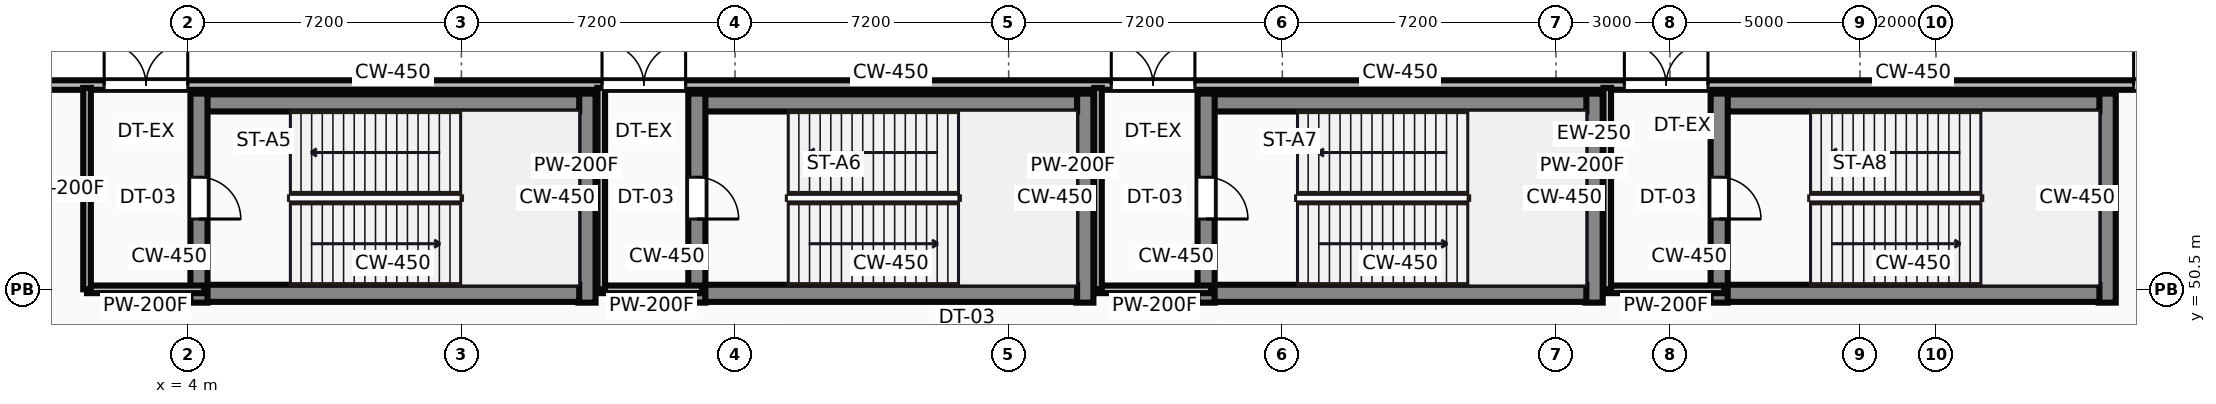
"""IFC4 building model, lengths in metres.
Left out: names, types, materials, properties, quantities, classifications, styles, units other than length and angle.
Written with IfcOpenShell. Run it as: python <this file> out.ifc"""

import sys

from ifc_helpers import new_model, si_unit, direction, frame, frame_2d, origin, place, context, subcontext, project, spatial, rectangle, extrude, source, transform, mapped, element, fill, save


model = new_model("IFC4")
c1 = context("Model", 3, precision=1e-05, world=origin(), true_north=direction((0.0, 1.0)))
c2 = subcontext(c1, "Body", "Model", "MODEL_VIEW")
j1 = project(units=[si_unit("LENGTHUNIT", "METRE"), si_unit("PLANEANGLEUNIT", "RADIAN")], contexts=[c1])
p1 = place(None, origin())
s1 = spatial("IfcSite", under=j1, at=p1, CompositionType="ELEMENT")
p2 = place(p1, origin())
s2 = spatial("IfcBuilding", under=s1, at=p2, CompositionType="ELEMENT")
p3 = place(p2, origin())
s3 = spatial("IfcBuildingStorey", under=s2, at=p3, CompositionType="ELEMENT", Elevation=0.0)
m1 = source(origin(), c2, "Body", "SweptSolid", [
    extrude(rectangle(XDim=82.0, YDim=0.25, at=frame_2d((41.0, 0.0))), origin(), (0.0, 0.0, 1.0), 5.7),
])
p4 = place(p3, frame((82.0, 55.875, 0.0), z_axis=(0.0, 0.0, 1.0), x_axis=(-1.0, 0.0, 0.0)))
e1 = element("IfcWall", 1, at=p4, inside=s3, PredefinedType="STANDARD", context=c2, shape_type="MappedRepresentation", body=[
    mapped(m1, transform((0.0, 0.0, 0.0))),
])
p5 = place(p4, frame((1.8, 0.0, 0.0)))
e2 = element("IfcOpeningElement", 2, at=p5, cuts=e1, PredefinedType="OPENING", context=c2, shape_type="SweptSolid", body=[
    extrude(rectangle(XDim=2.2, YDim=2.4, at=frame_2d((1.1, 1.2))), frame((0.0, 0.135, 0.0), z_axis=(0.0, -1.0, 0.0), x_axis=(1.0, 0.0, 0.0)), (0.0, 0.0, 1.0), 0.27),
])
p6 = place(p4, frame((14.9, 0.0, 0.0)))
e3 = element("IfcOpeningElement", 3, at=p6, cuts=e1, PredefinedType="OPENING", context=c2, shape_type="SweptSolid", body=[
    extrude(rectangle(XDim=2.2, YDim=2.4, at=frame_2d((1.1, 1.2))), frame((0.0, 0.135, 0.0), z_axis=(0.0, -1.0, 0.0), x_axis=(1.0, 0.0, 0.0)), (0.0, 0.0, 1.0), 0.27),
])
p7 = place(p4, frame((18.2, 0.0, 0.0)))
e4 = element("IfcOpeningElement", 4, at=p7, cuts=e1, PredefinedType="OPENING", context=c2, shape_type="SweptSolid", body=[
    extrude(rectangle(XDim=2.2, YDim=2.4, at=frame_2d((1.1, 1.2))), frame((0.0, 0.135, 0.0), z_axis=(0.0, -1.0, 0.0), x_axis=(1.0, 0.0, 0.0)), (0.0, 0.0, 1.0), 0.27),
])
p8 = place(p4, frame((21.4, 0.0, 0.0)))
e5 = element("IfcOpeningElement", 5, at=p8, cuts=e1, PredefinedType="OPENING", context=c2, shape_type="SweptSolid", body=[
    extrude(rectangle(XDim=2.2, YDim=2.4, at=frame_2d((1.1, 1.2))), frame((0.0, 0.135, 0.0), z_axis=(0.0, -1.0, 0.0), x_axis=(1.0, 0.0, 0.0)), (0.0, 0.0, 1.0), 0.27),
])
p9 = place(p4, frame((24.6, 0.0, 0.0)))
e6 = element("IfcOpeningElement", 6, at=p9, cuts=e1, PredefinedType="OPENING", context=c2, shape_type="SweptSolid", body=[
    extrude(rectangle(XDim=2.2, YDim=2.4, at=frame_2d((1.1, 1.2))), frame((0.0, 0.135, 0.0), z_axis=(0.0, -1.0, 0.0), x_axis=(1.0, 0.0, 0.0)), (0.0, 0.0, 1.0), 0.27),
])
p10 = place(p4, frame((38.0, 0.0, 0.0)))
e7 = element("IfcOpeningElement", 7, at=p10, cuts=e1, PredefinedType="OPENING", context=c2, shape_type="SweptSolid", body=[
    extrude(rectangle(XDim=2.2, YDim=2.4, at=frame_2d((1.1, 1.2))), frame((0.0, 0.135, 0.0), z_axis=(0.0, -1.0, 0.0), x_axis=(1.0, 0.0, 0.0)), (0.0, 0.0, 1.0), 0.27),
])
p11 = place(p4, frame((51.5, 0.0, 0.0)))
e8 = element("IfcOpeningElement", 8, at=p11, cuts=e1, PredefinedType="OPENING", context=c2, shape_type="SweptSolid", body=[
    extrude(rectangle(XDim=2.2, YDim=2.4, at=frame_2d((1.1, 1.2))), frame((0.0, 0.135, 0.0), z_axis=(0.0, -1.0, 0.0), x_axis=(1.0, 0.0, 0.0)), (0.0, 0.0, 1.0), 0.27),
])
p12 = place(p4, frame((64.9, 0.0, 0.0)))
e9 = element("IfcOpeningElement", 9, at=p12, cuts=e1, PredefinedType="OPENING", context=c2, shape_type="SweptSolid", body=[
    extrude(rectangle(XDim=2.2, YDim=2.4, at=frame_2d((1.1, 1.2))), frame((0.0, 0.135, 0.0), z_axis=(0.0, -1.0, 0.0), x_axis=(1.0, 0.0, 0.0)), (0.0, 0.0, 1.0), 0.27),
])
p13 = place(p4, frame((78.0, 0.0, 0.0)))
e10 = element("IfcOpeningElement", 10, at=p13, cuts=e1, PredefinedType="OPENING", context=c2, shape_type="SweptSolid", body=[
    extrude(rectangle(XDim=2.2, YDim=2.4, at=frame_2d((1.1, 1.2))), frame((0.0, 0.135, 0.0), z_axis=(0.0, -1.0, 0.0), x_axis=(1.0, 0.0, 0.0)), (0.0, 0.0, 1.0), 0.27),
])
p14 = place(p4, frame((6.5, 0.0, 0.9)))
e11 = element("IfcOpeningElement", 11, at=p14, cuts=e1, PredefinedType="OPENING", context=c2, shape_type="SweptSolid", body=[
    extrude(rectangle(XDim=3.0, YDim=2.4, at=frame_2d((1.5, 1.2))), frame((0.0, 0.135, 0.0), z_axis=(0.0, -1.0, 0.0), x_axis=(1.0, 0.0, 0.0)), (0.0, 0.0, 1.0), 0.27),
])
m2 = source(origin(), c2, "Body", "SweptSolid", [
    extrude(rectangle(XDim=5.5, YDim=0.45, at=frame_2d((2.75, 0.0))), origin(), (0.0, 0.0, 1.0), 6.0),
])
p15 = place(p3, frame((4.295, 50.15, 0.0), z_axis=(0.0, 0.0, 1.0), x_axis=(0.0, 1.0, 0.0)))
e12 = element("IfcWall", 12, at=p15, inside=s3, PredefinedType="SHEAR", context=c2, shape_type="MappedRepresentation", body=[
    mapped(m2, transform((0.0, 0.0, 0.0))),
])
p16 = place(p15, frame((2.2, 0.0, 0.0)))
e13 = element("IfcOpeningElement", 13, at=p16, cuts=e12, PredefinedType="OPENING", context=c2, shape_type="SweptSolid", body=[
    extrude(rectangle(XDim=1.1, YDim=2.15, at=frame_2d((0.55, 1.075))), frame((0.0, 0.235, 0.0), z_axis=(0.0, -1.0, 0.0), x_axis=(1.0, 0.0, 0.0)), (0.0, 0.0, 1.0), 0.47),
])
m3 = source(origin(), c2, "Body", "SweptSolid", [
    extrude(rectangle(XDim=9.8, YDim=0.45, at=frame_2d((4.9, 0.0))), origin(), (0.0, 0.0, 1.0), 6.0),
])
for number, where, z_axis, x_axis in (
    (14, (4.5, 50.395, 0.0), (0.0, 0.0, 1.0), (1.0, 0.0, 0.0)),
    (15, (4.5, 55.405, 0.0), (0.0, 0.0, 1.0), (1.0, 0.0, 0.0)),
):
    element("IfcWall", number, at=place(p3, frame(where, z_axis=z_axis, x_axis=x_axis)), inside=s3, PredefinedType="SHEAR", context=c2, shape_type="MappedRepresentation", body=[
        mapped(m3, transform((0.0, 0.0, 0.0))),
    ])
p17 = place(p3, frame((14.505, 50.15, 0.0), z_axis=(0.0, 0.0, 1.0), x_axis=(0.0, 1.0, 0.0)))
e16 = element("IfcWall", 16, at=p17, inside=s3, PredefinedType="SHEAR", context=c2, shape_type="MappedRepresentation", body=[
    mapped(m2, transform((0.0, 0.0, 0.0))),
])
p18 = place(p3, frame((17.395, 50.15, 0.0), z_axis=(0.0, 0.0, 1.0), x_axis=(0.0, 1.0, 0.0)))
e17 = element("IfcWall", 17, at=p18, inside=s3, PredefinedType="SHEAR", context=c2, shape_type="MappedRepresentation", body=[
    mapped(m2, transform((0.0, 0.0, 0.0))),
])
p19 = place(p18, frame((2.2, 0.0, 0.0)))
e18 = element("IfcOpeningElement", 18, at=p19, cuts=e17, PredefinedType="OPENING", context=c2, shape_type="SweptSolid", body=[
    extrude(rectangle(XDim=1.1, YDim=2.15, at=frame_2d((0.55, 1.075))), frame((0.0, 0.235, 0.0), z_axis=(0.0, -1.0, 0.0), x_axis=(1.0, 0.0, 0.0)), (0.0, 0.0, 1.0), 0.47),
])
m4 = source(origin(), c2, "Body", "SweptSolid", [
    extrude(rectangle(XDim=9.8, YDim=0.45, at=frame_2d((4.9, 0.0))), origin(), (0.0, 0.0, 1.0), 6.0),
])
for number, where, z_axis, x_axis in (
    (19, (17.6, 50.395, 0.0), (0.0, 0.0, 1.0), (1.0, 0.0, 0.0)),
    (20, (17.6, 55.405, 0.0), (0.0, 0.0, 1.0), (1.0, 0.0, 0.0)),
):
    element("IfcWall", number, at=place(p3, frame(where, z_axis=z_axis, x_axis=x_axis)), inside=s3, PredefinedType="SHEAR", context=c2, shape_type="MappedRepresentation", body=[
        mapped(m4, transform((0.0, 0.0, 0.0))),
    ])
p20 = place(p3, frame((27.605, 50.15, 0.0), z_axis=(0.0, 0.0, 1.0), x_axis=(0.0, 1.0, 0.0)))
e21 = element("IfcWall", 21, at=p20, inside=s3, PredefinedType="SHEAR", context=c2, shape_type="MappedRepresentation", body=[
    mapped(m2, transform((0.0, 0.0, 0.0))),
])
p21 = place(p3, frame((30.795, 50.15, 0.0), z_axis=(0.0, 0.0, 1.0), x_axis=(0.0, 1.0, 0.0)))
e22 = element("IfcWall", 22, at=p21, inside=s3, PredefinedType="SHEAR", context=c2, shape_type="MappedRepresentation", body=[
    mapped(m2, transform((0.0, 0.0, 0.0))),
])
p22 = place(p21, frame((2.2, 0.0, 0.0)))
e23 = element("IfcOpeningElement", 23, at=p22, cuts=e22, PredefinedType="OPENING", context=c2, shape_type="SweptSolid", body=[
    extrude(rectangle(XDim=1.1, YDim=2.15, at=frame_2d((0.55, 1.075))), frame((0.0, 0.235, 0.0), z_axis=(0.0, -1.0, 0.0), x_axis=(1.0, 0.0, 0.0)), (0.0, 0.0, 1.0), 0.47),
])
for number, where, z_axis, x_axis in (
    (24, (31.0, 50.395, 0.0), (0.0, 0.0, 1.0), (1.0, 0.0, 0.0)),
    (25, (31.0, 55.405, 0.0), (0.0, 0.0, 1.0), (1.0, 0.0, 0.0)),
):
    element("IfcWall", number, at=place(p3, frame(where, z_axis=z_axis, x_axis=x_axis)), inside=s3, PredefinedType="SHEAR", context=c2, shape_type="MappedRepresentation", body=[
        mapped(m3, transform((0.0, 0.0, 0.0))),
    ])
p23 = place(p3, frame((41.005, 50.15, 0.0), z_axis=(0.0, 0.0, 1.0), x_axis=(0.0, 1.0, 0.0)))
e26 = element("IfcWall", 26, at=p23, inside=s3, PredefinedType="SHEAR", context=c2, shape_type="MappedRepresentation", body=[
    mapped(m2, transform((0.0, 0.0, 0.0))),
])
p24 = place(p3, frame((44.295, 50.15, 0.0), z_axis=(0.0, 0.0, 1.0), x_axis=(0.0, 1.0, 0.0)))
e27 = element("IfcWall", 27, at=p24, inside=s3, PredefinedType="SHEAR", context=c2, shape_type="MappedRepresentation", body=[
    mapped(m2, transform((0.0, 0.0, 0.0))),
])
p25 = place(p24, frame((2.2, 0.0, 0.0)))
e28 = element("IfcOpeningElement", 28, at=p25, cuts=e27, PredefinedType="OPENING", context=c2, shape_type="SweptSolid", body=[
    extrude(rectangle(XDim=1.1, YDim=2.15, at=frame_2d((0.55, 1.075))), frame((0.0, 0.235, 0.0), z_axis=(0.0, -1.0, 0.0), x_axis=(1.0, 0.0, 0.0)), (0.0, 0.0, 1.0), 0.47),
])
for number, where, z_axis, x_axis in (
    (29, (44.5, 50.395, 0.0), (0.0, 0.0, 1.0), (1.0, 0.0, 0.0)),
    (30, (44.5, 55.405, 0.0), (0.0, 0.0, 1.0), (1.0, 0.0, 0.0)),
):
    element("IfcWall", number, at=place(p3, frame(where, z_axis=z_axis, x_axis=x_axis)), inside=s3, PredefinedType="SHEAR", context=c2, shape_type="MappedRepresentation", body=[
        mapped(m3, transform((0.0, 0.0, 0.0))),
    ])
p26 = place(p3, frame((54.505, 50.15, 0.0), z_axis=(0.0, 0.0, 1.0), x_axis=(0.0, 1.0, 0.0)))
e31 = element("IfcWall", 31, at=p26, inside=s3, PredefinedType="SHEAR", context=c2, shape_type="MappedRepresentation", body=[
    mapped(m2, transform((0.0, 0.0, 0.0))),
])
m5 = source(origin(), c2, "Body", "SweptSolid", [
    extrude(rectangle(XDim=5.3, YDim=0.2, at=frame_2d((2.65, 0.0))), origin(), (0.0, 0.0, 1.0), 5.7),
])
p27 = place(p3, frame((1.35, 50.5, 0.0), z_axis=(0.0, 0.0, 1.0), x_axis=(0.0, 1.0, 0.0)))
e32 = element("IfcWall", 32, at=p27, inside=s3, PredefinedType="PARTITIONING", context=c2, shape_type="MappedRepresentation", body=[
    mapped(m5, transform((0.0, 0.0, 0.0))),
])
m6 = source(origin(), c2, "Body", "SweptSolid", [
    extrude(rectangle(XDim=3.08, YDim=0.2, at=frame_2d((1.54, 0.0))), origin(), (0.0, 0.0, 1.0), 5.7),
])
p28 = place(p3, frame((1.35, 50.5, 0.0), z_axis=(0.0, 0.0, 1.0), x_axis=(1.0, 0.0, 0.0)))
e33 = element("IfcWall", 33, at=p28, inside=s3, PredefinedType="PARTITIONING", context=c2, shape_type="MappedRepresentation", body=[
    mapped(m6, transform((0.0, 0.0, 0.0))),
])
p29 = place(p3, frame((14.88, 50.5, 0.0), z_axis=(0.0, 0.0, 1.0), x_axis=(0.0, 1.0, 0.0)))
e34 = element("IfcWall", 34, at=p29, inside=s3, PredefinedType="PARTITIONING", context=c2, shape_type="MappedRepresentation", body=[
    mapped(m5, transform((0.0, 0.0, 0.0))),
])
m7 = source(origin(), c2, "Body", "SweptSolid", [
    extrude(rectangle(XDim=2.65, YDim=0.2, at=frame_2d((1.325, 0.0))), origin(), (0.0, 0.0, 1.0), 5.7),
])
p30 = place(p3, frame((14.88, 50.5, 0.0), z_axis=(0.0, 0.0, 1.0), x_axis=(1.0, 0.0, 0.0)))
e35 = element("IfcWall", 35, at=p30, inside=s3, PredefinedType="PARTITIONING", context=c2, shape_type="MappedRepresentation", body=[
    mapped(m7, transform((0.0, 0.0, 0.0))),
])
p31 = place(p3, frame((27.95, 50.5, 0.0), z_axis=(0.0, 0.0, 1.0), x_axis=(0.0, 1.0, 0.0)))
e36 = element("IfcWall", 36, at=p31, inside=s3, PredefinedType="PARTITIONING", context=c2, shape_type="MappedRepresentation", body=[
    mapped(m5, transform((0.0, 0.0, 0.0))),
])
m8 = source(origin(), c2, "Body", "SweptSolid", [
    extrude(rectangle(XDim=2.98, YDim=0.2, at=frame_2d((1.49, 0.0))), origin(), (0.0, 0.0, 1.0), 5.7),
])
p32 = place(p3, frame((27.95, 50.5, 0.0), z_axis=(0.0, 0.0, 1.0), x_axis=(1.0, 0.0, 0.0)))
e37 = element("IfcWall", 37, at=p32, inside=s3, PredefinedType="PARTITIONING", context=c2, shape_type="MappedRepresentation", body=[
    mapped(m8, transform((0.0, 0.0, 0.0))),
])
p33 = place(p3, frame((41.35, 50.5, 0.0), z_axis=(0.0, 0.0, 1.0), x_axis=(0.0, 1.0, 0.0)))
e38 = element("IfcWall", 38, at=p33, inside=s3, PredefinedType="PARTITIONING", context=c2, shape_type="MappedRepresentation", body=[
    mapped(m5, transform((0.0, 0.0, 0.0))),
])
p34 = place(p3, frame((41.35, 50.5, 0.0), z_axis=(0.0, 0.0, 1.0), x_axis=(1.0, 0.0, 0.0)))
e39 = element("IfcWall", 39, at=p34, inside=s3, PredefinedType="PARTITIONING", context=c2, shape_type="MappedRepresentation", body=[
    mapped(m6, transform((0.0, 0.0, 0.0))),
])
m9 = source(origin(), c2, "Body", "SweptSolid", [
    extrude(rectangle(XDim=2.2, YDim=2.4, at=frame_2d((1.1, 1.2))), frame((0.0, 0.025, 0.0), z_axis=(0.0, -1.0, 0.0), x_axis=(1.0, 0.0, 0.0)), (0.0, 0.0, 1.0), 0.05),
])
p35 = place(p9, frame((2.2, 0.0, 0.0), z_axis=(0.0, 0.0, 1.0), x_axis=(-1.0, 0.0, 0.0)))
e40 = element("IfcDoor", 40, at=p35, inside=s3, OperationType="DOUBLE_DOOR_SINGLE_SWING", PredefinedType="DOOR", context=c2, shape_type="MappedRepresentation", body=[
    mapped(m9, transform((0.0, 0.0, 0.0))),
])
fill(e6, e40)
p36 = place(p10, frame((2.2, 0.0, 0.0), z_axis=(0.0, 0.0, 1.0), x_axis=(-1.0, 0.0, 0.0)))
e41 = element("IfcDoor", 41, at=p36, inside=s3, OperationType="DOUBLE_DOOR_SINGLE_SWING", PredefinedType="DOOR", context=c2, shape_type="MappedRepresentation", body=[
    mapped(m9, transform((0.0, 0.0, 0.0))),
])
fill(e7, e41)
p37 = place(p11, frame((2.2, 0.0, 0.0), z_axis=(0.0, 0.0, 1.0), x_axis=(-1.0, 0.0, 0.0)))
e42 = element("IfcDoor", 42, at=p37, inside=s3, OperationType="DOUBLE_DOOR_SINGLE_SWING", PredefinedType="DOOR", context=c2, shape_type="MappedRepresentation", body=[
    mapped(m9, transform((0.0, 0.0, 0.0))),
])
fill(e8, e42)
p38 = place(p12, frame((2.2, 0.0, 0.0), z_axis=(0.0, 0.0, 1.0), x_axis=(-1.0, 0.0, 0.0)))
e43 = element("IfcDoor", 43, at=p38, inside=s3, OperationType="DOUBLE_DOOR_SINGLE_SWING", PredefinedType="DOOR", context=c2, shape_type="MappedRepresentation", body=[
    mapped(m9, transform((0.0, 0.0, 0.0))),
])
fill(e9, e43)
p39 = place(p13, frame((2.2, 0.0, 0.0), z_axis=(0.0, 0.0, 1.0), x_axis=(-1.0, 0.0, 0.0)))
e44 = element("IfcDoor", 44, at=p39, inside=s3, OperationType="DOUBLE_DOOR_SINGLE_SWING", PredefinedType="DOOR", context=c2, shape_type="MappedRepresentation", body=[
    mapped(m9, transform((0.0, 0.0, 0.0))),
])
fill(e10, e44)
m10 = source(origin(), c2, "Body", "SweptSolid", [
    extrude(rectangle(XDim=1.1, YDim=2.15, at=frame_2d((0.55, 1.075))), frame((0.0, 0.025, 0.0), z_axis=(0.0, -1.0, 0.0), x_axis=(1.0, 0.0, 0.0)), (0.0, 0.0, 1.0), 0.05),
])
p40 = place(p16, origin())
e45 = element("IfcDoor", 45, at=p40, inside=s3, OperationType="SINGLE_SWING_LEFT", PredefinedType="DOOR", context=c2, shape_type="MappedRepresentation", body=[
    mapped(m10, transform((0.0, 0.0, 0.0))),
])
fill(e13, e45)
p41 = place(p19, origin())
e46 = element("IfcDoor", 46, at=p41, inside=s3, OperationType="SINGLE_SWING_LEFT", PredefinedType="DOOR", context=c2, shape_type="MappedRepresentation", body=[
    mapped(m10, transform((0.0, 0.0, 0.0))),
])
fill(e18, e46)
p42 = place(p22, origin())
e47 = element("IfcDoor", 47, at=p42, inside=s3, OperationType="SINGLE_SWING_LEFT", PredefinedType="DOOR", context=c2, shape_type="MappedRepresentation", body=[
    mapped(m10, transform((0.0, 0.0, 0.0))),
])
fill(e23, e47)
p43 = place(p25, origin())
e48 = element("IfcDoor", 48, at=p43, inside=s3, OperationType="SINGLE_SWING_LEFT", PredefinedType="DOOR", context=c2, shape_type="MappedRepresentation", body=[
    mapped(m10, transform((0.0, 0.0, 0.0))),
])
fill(e28, e48)
save(model, sys.argv[1])
